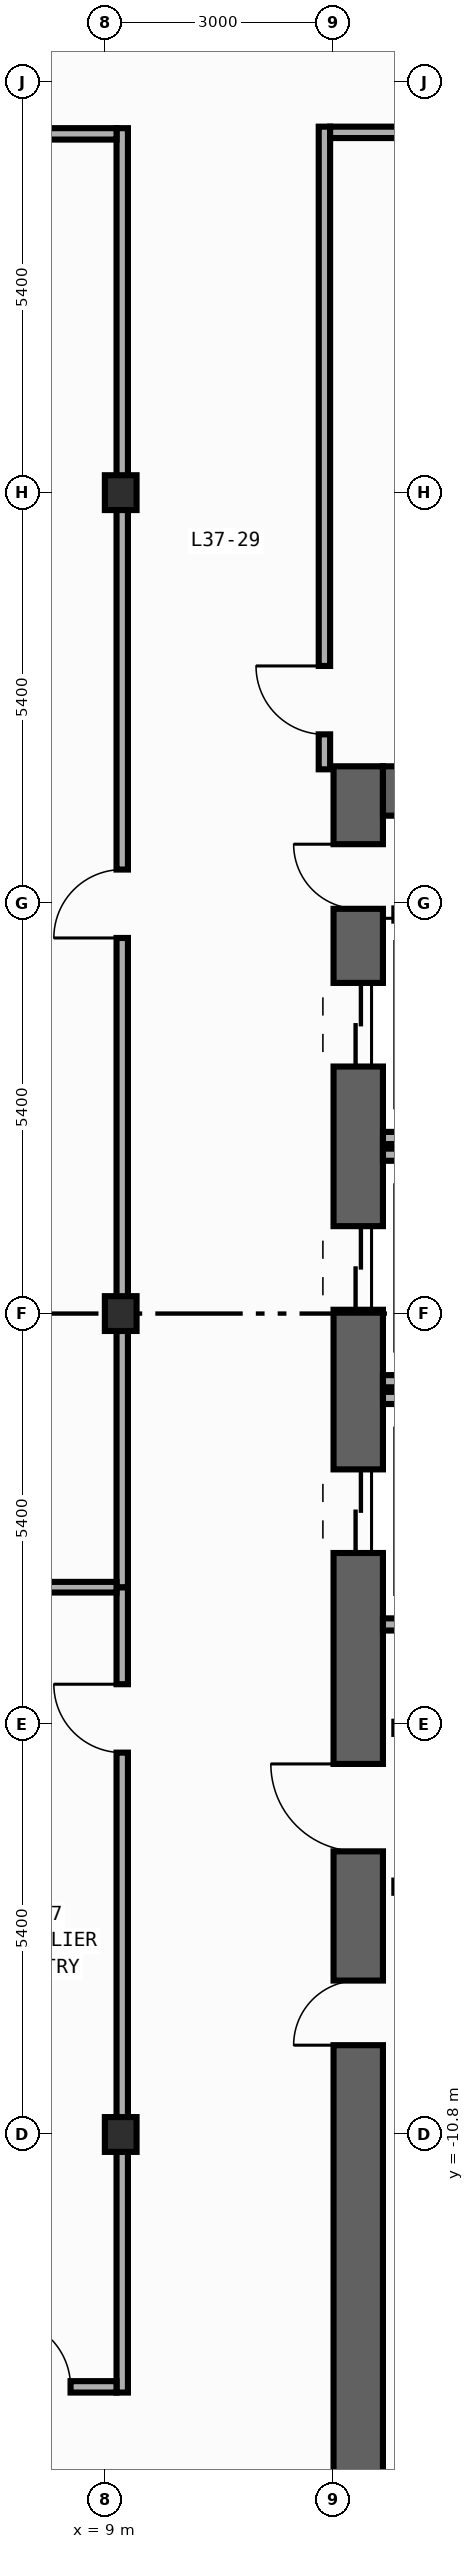
"""IFC4 building model, lengths in metres.
Left out: names, types, materials, properties, quantities, classifications, styles, units other than length and angle.
Written with IfcOpenShell. Run it as: python <this file> out.ifc"""

import sys

from ifc_helpers import new_model, si_unit, direction, frame, frame_2d, origin, origin_2d, place, context, subcontext, project, spatial, rectangle, i_section, extrude, element, fill, save


model = new_model("IFC4")
c1 = context("Model", 3, precision=1e-05, world=origin(), true_north=direction((0.0, 1.0)))
c2 = subcontext(c1, "Body", "Model", "MODEL_VIEW")
j1 = project(units=[si_unit("LENGTHUNIT", "METRE"), si_unit("PLANEANGLEUNIT", "RADIAN")], contexts=[c1])
p1 = place(None, origin())
s1 = spatial("IfcSite", under=j1, at=p1, CompositionType="ELEMENT")
p2 = place(p1, origin())
s2 = spatial("IfcBuilding", under=s1, at=p2, CompositionType="ELEMENT")
p3 = place(p2, frame((0.0, 0.0, 165.0)))
s3 = spatial("IfcBuildingStorey", under=s2, at=p3, CompositionType="ELEMENT", Elevation=165.0)
p4 = place(p3, frame((12.325, -19.8, 0.0), z_axis=(0.0, 0.0, 1.0), x_axis=(0.0, 1.0, 0.0)))
e1 = element("IfcWall", 1, at=p4, inside=s3, PredefinedType="SHEAR", context=c2, shape_type="SweptSolid", body=[
    extrude(rectangle(XDim=27.0, YDim=0.65, at=frame_2d((13.5, 0.0))), origin(), (0.0, 0.0, 1.0), 3.54),
])
p5 = place(p4, frame((23.05, 0.0, 0.0)))
e2 = element("IfcOpeningElement", 2, at=p5, cuts=e1, PredefinedType="OPENING", context=c2, shape_type="SweptSolid", body=[
    extrude(rectangle(XDim=1.1, YDim=2.2, at=frame_2d((0.55, 1.1))), frame((0.0, 0.335, 0.0), z_axis=(0.0, -1.0, 0.0), x_axis=(1.0, 0.0, 0.0)), (0.0, 0.0, 1.0), 0.67),
])
p6 = place(p4, frame((19.85, 0.0, 0.0)))
e3 = element("IfcOpeningElement", 3, at=p6, cuts=e1, PredefinedType="OPENING", context=c2, shape_type="SweptSolid", body=[
    extrude(rectangle(XDim=1.1, YDim=2.2, at=frame_2d((0.55, 1.1))), frame((0.0, 0.335, 0.0), z_axis=(0.0, -1.0, 0.0), x_axis=(1.0, 0.0, 0.0)), (0.0, 0.0, 1.0), 0.67),
])
p7 = place(p4, frame((16.65, 0.0, 0.0)))
e4 = element("IfcOpeningElement", 4, at=p7, cuts=e1, PredefinedType="OPENING", context=c2, shape_type="SweptSolid", body=[
    extrude(rectangle(XDim=1.1, YDim=2.2, at=frame_2d((0.55, 1.1))), frame((0.0, 0.335, 0.0), z_axis=(0.0, -1.0, 0.0), x_axis=(1.0, 0.0, 0.0)), (0.0, 0.0, 1.0), 0.67),
])
p8 = place(p4, frame((10.175, 0.0, 0.0)))
e5 = element("IfcOpeningElement", 5, at=p8, cuts=e1, PredefinedType="OPENING", context=c2, shape_type="SweptSolid", body=[
    extrude(rectangle(XDim=0.85, YDim=2.1, at=frame_2d((0.425, 1.05))), frame((0.0, 0.335, 0.0), z_axis=(0.0, -1.0, 0.0), x_axis=(1.0, 0.0, 0.0)), (0.0, 0.0, 1.0), 0.67),
])
p9 = place(p4, frame((12.725, 0.0, 0.0)))
e6 = element("IfcOpeningElement", 6, at=p9, cuts=e1, PredefinedType="OPENING", context=c2, shape_type="SweptSolid", body=[
    extrude(rectangle(XDim=1.15, YDim=2.2, at=frame_2d((0.575, 1.1))), frame((0.0, 0.335, 0.0), z_axis=(0.0, -1.0, 0.0), x_axis=(1.0, 0.0, 0.0)), (0.0, 0.0, 1.0), 0.67),
])
p10 = place(p4, frame((25.125, 0.0, 0.0)))
e7 = element("IfcOpeningElement", 7, at=p10, cuts=e1, PredefinedType="OPENING", context=c2, shape_type="SweptSolid", body=[
    extrude(rectangle(XDim=0.85, YDim=2.1, at=frame_2d((0.425, 1.05))), frame((0.0, 0.335, 0.0), z_axis=(0.0, -1.0, 0.0), x_axis=(1.0, 0.0, 0.0)), (0.0, 0.0, 1.0), 0.67),
])
p11 = place(p3, frame((12.65, 6.875, 0.0), z_axis=(0.0, 0.0, 1.0), x_axis=(1.0, 0.0, 0.0)))
e8 = element("IfcWall", 8, at=p11, inside=s3, PredefinedType="SHEAR", context=c2, shape_type="SweptSolid", body=[
    extrude(rectangle(XDim=7.1, YDim=0.65, at=frame_2d((3.55, 0.0))), origin(), (0.0, 0.0, 1.0), 3.54),
])
for number, where, z_axis, x_axis in (
    (9, (9.2, -10.8, 0.0), (0.0, 0.0, 1.0), (1.0, 0.0, 0.0)),
    (10, (9.2, 0.0, 0.0), (0.0, 0.0, 1.0), (1.0, 0.0, 0.0)),
    (11, (9.2, 10.8, 0.0), (0.0, 0.0, 1.0), (1.0, 0.0, 0.0)),
):
    element("IfcColumn", number, at=place(p3, frame(where, z_axis=z_axis, x_axis=x_axis)), inside=s3, PredefinedType="COLUMN", context=c2, shape_type="SweptSolid", body=[
        extrude(i_section(OverallWidth=0.417, OverallDepth=0.458, WebThickness=0.03, FlangeThickness=0.05, FilletRadius=0.022, at=origin_2d()), origin(), (0.0, 0.0, 1.0), 3.8),
    ])
for number, where, z_axis, x_axis in (
    (12, (12.65, 2.31, 0.0), (0.0, 0.0, 1.0), (1.0, 0.0, 0.0)),
    (13, (12.65, -0.89, 0.0), (0.0, 0.0, 1.0), (1.0, 0.0, 0.0)),
    (14, (12.65, 2.09, 0.0), (0.0, 0.0, 1.0), (1.0, 0.0, 0.0)),
    (15, (12.65, -4.09, 0.0), (0.0, 0.0, 1.0), (1.0, 0.0, 0.0)),
    (16, (12.65, -1.11, 0.0), (0.0, 0.0, 1.0), (1.0, 0.0, 0.0)),
):
    element("IfcWall", number, at=place(p3, frame(where, z_axis=z_axis, x_axis=x_axis)), inside=s3, PredefinedType="STANDARD", context=c2, shape_type="SweptSolid", body=[
        extrude(rectangle(XDim=2.34, YDim=0.16, at=frame_2d((1.17, 0.0))), origin(), (0.0, 0.0, 1.0), 3.54),
    ])
for number, where, z_axis, x_axis in (
    (17, (12.8, -5.45, 0.0), (0.0, 0.0, 1.0), (1.0, 0.0, 0.0)),
    (18, (12.8, -7.54, 0.0), (0.0, 0.0, 1.0), (1.0, 0.0, 0.0)),
    (19, (12.8, 5.25, 0.0), (0.0, 0.0, 1.0), (1.0, 0.0, 0.0)),
):
    element("IfcWall", number, at=place(p3, frame(where, z_axis=z_axis, x_axis=x_axis)), inside=s3, PredefinedType="STANDARD", context=c2, shape_type="SweptSolid", body=[
        extrude(rectangle(XDim=2.6, YDim=0.16, at=frame_2d((1.3, 0.0))), origin(), (0.0, 0.0, 1.0), 3.54),
    ])
p12 = place(p3, frame((9.22, -14.195, 0.0), z_axis=(0.0, 0.0, 1.0), x_axis=(0.0, 1.0, 0.0)))
e20 = element("IfcWall", 20, at=p12, inside=s3, PredefinedType="PARTITIONING", context=c2, shape_type="SweptSolid", body=[
    extrude(rectangle(XDim=10.595, YDim=0.15, at=frame_2d((5.297, 0.0))), origin(), (0.0, 0.0, 1.0), 2.952),
])
p13 = place(p12, frame((8.419, 0.0, 0.0)))
e21 = element("IfcOpeningElement", 21, at=p13, cuts=e20, PredefinedType="OPENING", context=c2, shape_type="SweptSolid", body=[
    extrude(rectangle(XDim=0.9, YDim=2.15, at=frame_2d((0.45, 1.075))), frame((0.0, 0.085, 0.0), z_axis=(0.0, -1.0, 0.0), x_axis=(1.0, 0.0, 0.0)), (0.0, 0.0, 1.0), 0.17),
])
p14 = place(p3, frame((9.22, -3.6, 0.0), z_axis=(0.0, 0.0, 1.0), x_axis=(0.0, 1.0, 0.0)))
e22 = element("IfcWall", 22, at=p14, inside=s3, PredefinedType="PARTITIONING", context=c2, shape_type="SweptSolid", body=[
    extrude(rectangle(XDim=19.195, YDim=0.15, at=frame_2d((9.598, 0.0))), origin(), (0.0, 0.0, 1.0), 2.952),
])
p15 = place(p14, frame((8.542, 0.0, 0.0)))
e23 = element("IfcOpeningElement", 23, at=p15, cuts=e22, PredefinedType="OPENING", context=c2, shape_type="SweptSolid", body=[
    extrude(rectangle(XDim=0.9, YDim=2.15, at=frame_2d((0.45, 1.075))), frame((0.0, 0.085, 0.0), z_axis=(0.0, -1.0, 0.0), x_axis=(1.0, 0.0, 0.0)), (0.0, 0.0, 1.0), 0.17),
])
p16 = place(p3, frame((11.88, 7.16, 0.0), z_axis=(0.0, 0.0, 1.0), x_axis=(0.0, 1.0, 0.0)))
e24 = element("IfcWall", 24, at=p16, inside=s3, PredefinedType="PARTITIONING", context=c2, shape_type="SweptSolid", body=[
    extrude(rectangle(XDim=8.455, YDim=0.15, at=frame_2d((4.228, 0.0))), origin(), (0.0, 0.0, 1.0), 3.54),
])
p17 = place(p16, frame((0.46, 0.0, 0.0)))
e25 = element("IfcOpeningElement", 25, at=p17, cuts=e24, PredefinedType="OPENING", context=c2, shape_type="SweptSolid", body=[
    extrude(rectangle(XDim=0.9, YDim=2.15, at=frame_2d((0.45, 1.075))), frame((0.0, 0.085, 0.0), z_axis=(0.0, -1.0, 0.0), x_axis=(1.0, 0.0, 0.0)), (0.0, 0.0, 1.0), 0.17),
])
p18 = place(p3, frame((-9.145, 15.52, 0.0), z_axis=(0.0, 0.0, 1.0), x_axis=(1.0, 0.0, 0.0)))
e26 = element("IfcWall", 26, at=p18, inside=s3, PredefinedType="PARTITIONING", context=c2, shape_type="SweptSolid", body=[
    extrude(rectangle(XDim=18.29, YDim=0.15, at=frame_2d((9.145, 0.0))), origin(), (0.0, 0.0, 1.0), 3.54),
])
p19 = place(p18, frame((15.725, 0.0, 0.0)))
e27 = element("IfcOpeningElement", 27, at=p19, cuts=e26, PredefinedType="OPENING", context=c2, shape_type="SweptSolid", body=[
    extrude(rectangle(XDim=0.9, YDim=2.15, at=frame_2d((0.45, 1.075))), frame((0.0, 0.085, 0.0), z_axis=(0.0, -1.0, 0.0), x_axis=(1.0, 0.0, 0.0)), (0.0, 0.0, 1.0), 0.17),
])
p20 = place(p3, frame((11.955, 15.54, 0.0), z_axis=(0.0, 0.0, 1.0), x_axis=(1.0, 0.0, 0.0)))
e28 = element("IfcWall", 28, at=p20, inside=s3, PredefinedType="PARTITIONING", context=c2, shape_type="SweptSolid", body=[
    extrude(rectangle(XDim=10.5, YDim=0.15, at=frame_2d((5.25, 0.0))), origin(), (0.0, 0.0, 1.0), 3.54),
])
p21 = place(p20, frame((4.901, 0.0, 0.0)))
e29 = element("IfcOpeningElement", 29, at=p21, cuts=e28, PredefinedType="OPENING", context=c2, shape_type="SweptSolid", body=[
    extrude(rectangle(XDim=0.9, YDim=2.15, at=frame_2d((0.45, 1.075))), frame((0.0, 0.085, 0.0), z_axis=(0.0, -1.0, 0.0), x_axis=(1.0, 0.0, 0.0)), (0.0, 0.0, 1.0), 0.17),
])
p22 = place(p3, frame((7.18, -14.12, 0.0), z_axis=(0.0, 0.0, 1.0), x_axis=(1.0, 0.0, 0.0)))
e30 = element("IfcWall", 30, at=p22, inside=s3, PredefinedType="PARTITIONING", context=c2, shape_type="SweptSolid", body=[
    extrude(rectangle(XDim=1.965, YDim=0.15, at=frame_2d((0.982, 0.0))), origin(), (0.0, 0.0, 1.0), 3.54),
])
p23 = place(p22, frame((0.46, 0.0, 0.0)))
e31 = element("IfcOpeningElement", 31, at=p23, cuts=e30, PredefinedType="OPENING", context=c2, shape_type="SweptSolid", body=[
    extrude(rectangle(XDim=0.9, YDim=2.15, at=frame_2d((0.45, 1.075))), frame((0.0, 0.085, 0.0), z_axis=(0.0, -1.0, 0.0), x_axis=(1.0, 0.0, 0.0)), (0.0, 0.0, 1.0), 0.17),
])
p24 = place(p3, frame((7.02, -3.6, 0.0), z_axis=(0.0, 0.0, 1.0), x_axis=(1.0, 0.0, 0.0)))
e32 = element("IfcWall", 32, at=p24, inside=s3, PredefinedType="PARTITIONING", context=c2, shape_type="SweptSolid", body=[
    extrude(rectangle(XDim=2.125, YDim=0.14, at=frame_2d((1.062, 0.0))), origin(), (0.0, 0.0, 1.0), 3.54),
])
p25 = place(p5, origin())
e33 = element("IfcDoor", 33, at=p25, inside=s3, OperationType="DOUBLE_DOOR_SLIDING", PredefinedType="DOOR", context=c2, shape_type="SweptSolid", body=[
    extrude(rectangle(XDim=1.1, YDim=2.2, at=frame_2d((0.55, 1.1))), frame((0.0, 0.025, 0.0), z_axis=(0.0, -1.0, 0.0), x_axis=(1.0, 0.0, 0.0)), (0.0, 0.0, 1.0), 0.05),
])
fill(e2, e33)
p26 = place(p6, origin())
e34 = element("IfcDoor", 34, at=p26, inside=s3, OperationType="DOUBLE_DOOR_SLIDING", PredefinedType="DOOR", context=c2, shape_type="SweptSolid", body=[
    extrude(rectangle(XDim=1.1, YDim=2.2, at=frame_2d((0.55, 1.1))), frame((0.0, 0.025, 0.0), z_axis=(0.0, -1.0, 0.0), x_axis=(1.0, 0.0, 0.0)), (0.0, 0.0, 1.0), 0.05),
])
fill(e3, e34)
p27 = place(p7, origin())
e35 = element("IfcDoor", 35, at=p27, inside=s3, OperationType="DOUBLE_DOOR_SLIDING", PredefinedType="DOOR", context=c2, shape_type="SweptSolid", body=[
    extrude(rectangle(XDim=1.1, YDim=2.2, at=frame_2d((0.55, 1.1))), frame((0.0, 0.025, 0.0), z_axis=(0.0, -1.0, 0.0), x_axis=(1.0, 0.0, 0.0)), (0.0, 0.0, 1.0), 0.05),
])
fill(e4, e35)
p28 = place(p8, origin())
e36 = element("IfcDoor", 36, at=p28, inside=s3, OperationType="SINGLE_SWING_LEFT", PredefinedType="DOOR", context=c2, shape_type="SweptSolid", body=[
    extrude(rectangle(XDim=0.85, YDim=2.1, at=frame_2d((0.425, 1.05))), frame((0.0, 0.025, 0.0), z_axis=(0.0, -1.0, 0.0), x_axis=(1.0, 0.0, 0.0)), (0.0, 0.0, 1.0), 0.05),
])
fill(e5, e36)
p29 = place(p9, origin())
e37 = element("IfcDoor", 37, at=p29, inside=s3, OperationType="SINGLE_SWING_RIGHT", PredefinedType="DOOR", context=c2, shape_type="SweptSolid", body=[
    extrude(rectangle(XDim=1.15, YDim=2.2, at=frame_2d((0.575, 1.1))), frame((0.0, 0.025, 0.0), z_axis=(0.0, -1.0, 0.0), x_axis=(1.0, 0.0, 0.0)), (0.0, 0.0, 1.0), 0.05),
])
fill(e6, e37)
p30 = place(p10, origin())
e38 = element("IfcDoor", 38, at=p30, inside=s3, OperationType="SINGLE_SWING_RIGHT", PredefinedType="DOOR", context=c2, shape_type="SweptSolid", body=[
    extrude(rectangle(XDim=0.85, YDim=2.1, at=frame_2d((0.425, 1.05))), frame((0.0, 0.025, 0.0), z_axis=(0.0, -1.0, 0.0), x_axis=(1.0, 0.0, 0.0)), (0.0, 0.0, 1.0), 0.05),
])
fill(e7, e38)
p31 = place(p13, origin())
e39 = element("IfcDoor", 39, at=p31, inside=s3, OperationType="SINGLE_SWING_RIGHT", PredefinedType="DOOR", context=c2, shape_type="SweptSolid", body=[
    extrude(rectangle(XDim=0.9, YDim=2.15, at=frame_2d((0.45, 1.075))), frame((0.0, 0.025, 0.0), z_axis=(0.0, -1.0, 0.0), x_axis=(1.0, 0.0, 0.0)), (0.0, 0.0, 1.0), 0.05),
])
fill(e21, e39)
p32 = place(p15, origin())
e40 = element("IfcDoor", 40, at=p32, inside=s3, OperationType="SINGLE_SWING_LEFT", PredefinedType="DOOR", context=c2, shape_type="SweptSolid", body=[
    extrude(rectangle(XDim=0.9, YDim=2.15, at=frame_2d((0.45, 1.075))), frame((0.0, 0.025, 0.0), z_axis=(0.0, -1.0, 0.0), x_axis=(1.0, 0.0, 0.0)), (0.0, 0.0, 1.0), 0.05),
])
fill(e23, e40)
p33 = place(p17, origin())
e41 = element("IfcDoor", 41, at=p33, inside=s3, OperationType="SINGLE_SWING_RIGHT", PredefinedType="DOOR", context=c2, shape_type="SweptSolid", body=[
    extrude(rectangle(XDim=0.9, YDim=2.15, at=frame_2d((0.45, 1.075))), frame((0.0, 0.025, 0.0), z_axis=(0.0, -1.0, 0.0), x_axis=(1.0, 0.0, 0.0)), (0.0, 0.0, 1.0), 0.05),
])
fill(e25, e41)
p34 = place(p23, origin())
e42 = element("IfcDoor", 42, at=p34, inside=s3, OperationType="SINGLE_SWING_LEFT", PredefinedType="DOOR", context=c2, shape_type="SweptSolid", body=[
    extrude(rectangle(XDim=0.9, YDim=2.15, at=frame_2d((0.45, 1.075))), frame((0.0, 0.025, 0.0), z_axis=(0.0, -1.0, 0.0), x_axis=(1.0, 0.0, 0.0)), (0.0, 0.0, 1.0), 0.05),
])
fill(e31, e42)
save(model, sys.argv[1])
